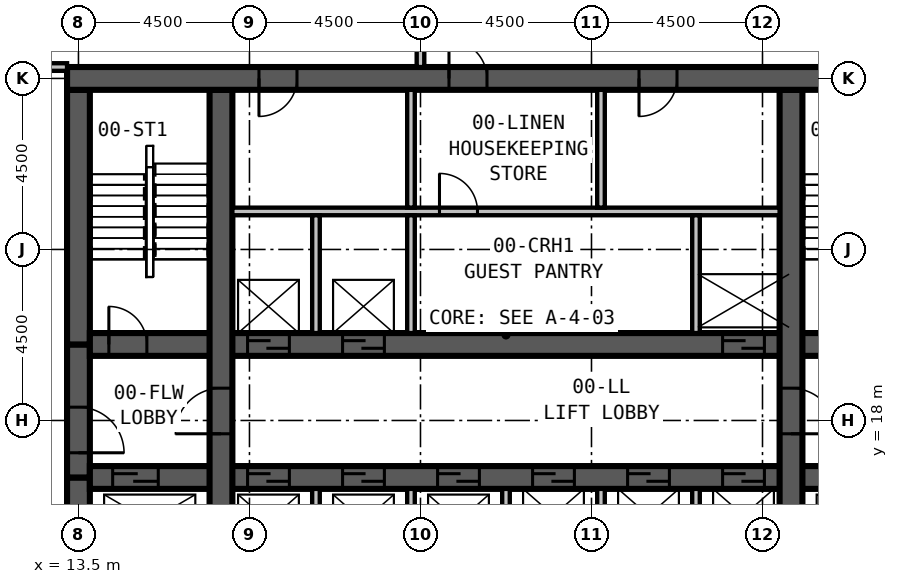
"""IFC4 building model, lengths in metres.
Left out: names, types, materials, properties, quantities, classifications, styles, units other than length and angle.
Written with IfcOpenShell. Run it as: python <this file> out.ifc"""

import sys

from ifc_helpers import new_model, si_unit, direction, frame, frame_2d, origin, place, context, subcontext, project, spatial, rectangle, extrude, element, fill, save


model = new_model("IFC4")
c1 = context("Model", 3, precision=1e-05, world=origin(), true_north=direction((0.0, 1.0)))
c2 = subcontext(c1, "Body", "Model", "MODEL_VIEW")
j1 = project(units=[si_unit("LENGTHUNIT", "METRE"), si_unit("PLANEANGLEUNIT", "RADIAN")], contexts=[c1])
p1 = place(None, origin())
s1 = spatial("IfcSite", under=j1, at=p1, CompositionType="ELEMENT")
p2 = place(p1, origin())
s2 = spatial("IfcBuilding", under=s1, at=p2, CompositionType="ELEMENT")
p3 = place(p2, origin())
s3 = spatial("IfcBuildingStorey", under=s2, at=p3, CompositionType="ELEMENT", Elevation=0.0)
p4 = place(p3, frame((36.3, 27.0, 0.0), z_axis=(0.0, 0.0, 1.0), x_axis=(-1.0, 0.0, 0.0)))
e1 = element("IfcWall", 1, at=p4, inside=s3, PredefinedType="SHEAR", context=c2, shape_type="SweptSolid", body=[
    extrude(rectangle(XDim=23.1, YDim=0.6, at=frame_2d((11.55, 0.0))), origin(), (0.0, 0.0, 1.0), 6.0),
])
p5 = place(p4, frame((17.05, 0.0, 0.0)))
e2 = element("IfcOpeningElement", 2, at=p5, cuts=e1, PredefinedType="OPENING", context=c2, shape_type="SweptSolid", body=[
    extrude(rectangle(XDim=1.0, YDim=2.1, at=frame_2d((0.5, 1.05))), frame((0.0, 0.31, 0.0), z_axis=(0.0, -1.0, 0.0), x_axis=(1.0, 0.0, 0.0)), (0.0, 0.0, 1.0), 0.62),
])
p6 = place(p4, frame((13.05, 0.0, 0.0), z_axis=(0.0, 0.0, 1.0), x_axis=(-1.0, 0.0, 0.0)))
e3 = element("IfcOpeningElement", 3, at=p6, cuts=e1, PredefinedType="OPENING", context=c2, shape_type="SweptSolid", body=[
    extrude(rectangle(XDim=1.0, YDim=2.1, at=frame_2d((0.5, 1.05))), frame((0.0, 0.31, 0.0), z_axis=(0.0, -1.0, 0.0), x_axis=(1.0, 0.0, 0.0)), (0.0, 0.0, 1.0), 0.62),
])
p7 = place(p4, frame((7.05, 0.0, 0.0)))
e4 = element("IfcOpeningElement", 4, at=p7, cuts=e1, PredefinedType="OPENING", context=c2, shape_type="SweptSolid", body=[
    extrude(rectangle(XDim=1.0, YDim=2.1, at=frame_2d((0.5, 1.05))), frame((0.0, 0.31, 0.0), z_axis=(0.0, -1.0, 0.0), x_axis=(1.0, 0.0, 0.0)), (0.0, 0.0, 1.0), 0.62),
])
p8 = place(p3, frame((17.25, 13.8, 0.0), z_axis=(0.0, 0.0, 1.0), x_axis=(0.0, 1.0, 0.0)))
e5 = element("IfcWall", 5, at=p8, inside=s3, PredefinedType="SHEAR", context=c2, shape_type="SweptSolid", body=[
    extrude(rectangle(XDim=12.9, YDim=0.6, at=frame_2d((6.45, 0.0))), origin(), (0.0, 0.0, 1.0), 6.0),
])
p9 = place(p8, frame((3.85, 0.0, 0.0)))
e6 = element("IfcOpeningElement", 6, at=p9, cuts=e5, PredefinedType="OPENING", context=c2, shape_type="SweptSolid", body=[
    extrude(rectangle(XDim=1.2, YDim=2.1, at=frame_2d((0.6, 1.05))), frame((0.0, 0.31, 0.0), z_axis=(0.0, -1.0, 0.0), x_axis=(1.0, 0.0, 0.0)), (0.0, 0.0, 1.0), 0.62),
])
p10 = place(p3, frame((32.25, 13.8, 0.0), z_axis=(0.0, 0.0, 1.0), x_axis=(0.0, 1.0, 0.0)))
e7 = element("IfcWall", 7, at=p10, inside=s3, PredefinedType="SHEAR", context=c2, shape_type="SweptSolid", body=[
    extrude(rectangle(XDim=12.9, YDim=0.6, at=frame_2d((6.45, 0.0))), origin(), (0.0, 0.0, 1.0), 6.0),
])
p11 = place(p10, frame((5.05, 0.0, 0.0), z_axis=(0.0, 0.0, 1.0), x_axis=(-1.0, 0.0, 0.0)))
e8 = element("IfcOpeningElement", 8, at=p11, cuts=e7, PredefinedType="OPENING", context=c2, shape_type="SweptSolid", body=[
    extrude(rectangle(XDim=1.2, YDim=2.1, at=frame_2d((0.6, 1.05))), frame((0.0, 0.31, 0.0), z_axis=(0.0, -1.0, 0.0), x_axis=(1.0, 0.0, 0.0)), (0.0, 0.0, 1.0), 0.62),
])
p12 = place(p3, frame((13.8, 16.5, 0.0), z_axis=(0.0, 0.0, 1.0), x_axis=(1.0, 0.0, 0.0)))
e9 = element("IfcWall", 9, at=p12, inside=s3, PredefinedType="SHEAR", context=c2, shape_type="SweptSolid", body=[
    extrude(rectangle(XDim=21.9, YDim=0.6, at=frame_2d((10.95, 0.0))), origin(), (0.0, 0.0, 1.0), 6.0),
])
p13 = place(p12, frame((4.15, 0.0, 0.0)))
e10 = element("IfcOpeningElement", 10, at=p13, cuts=e9, PredefinedType="OPENING", context=c2, shape_type="SweptSolid", body=[
    extrude(rectangle(XDim=1.1, YDim=2.1, at=frame_2d((0.55, 1.05))), frame((0.0, 0.31, 0.0), z_axis=(0.0, -1.0, 0.0), x_axis=(1.0, 0.0, 0.0)), (0.0, 0.0, 1.0), 0.62),
])
p14 = place(p12, frame((6.65, 0.0, 0.0)))
e11 = element("IfcOpeningElement", 11, at=p14, cuts=e9, PredefinedType="OPENING", context=c2, shape_type="SweptSolid", body=[
    extrude(rectangle(XDim=1.1, YDim=2.1, at=frame_2d((0.55, 1.05))), frame((0.0, 0.31, 0.0), z_axis=(0.0, -1.0, 0.0), x_axis=(1.0, 0.0, 0.0)), (0.0, 0.0, 1.0), 0.62),
])
p15 = place(p12, frame((9.15, 0.0, 0.0)))
e12 = element("IfcOpeningElement", 12, at=p15, cuts=e9, PredefinedType="OPENING", context=c2, shape_type="SweptSolid", body=[
    extrude(rectangle(XDim=1.1, YDim=2.1, at=frame_2d((0.55, 1.05))), frame((0.0, 0.31, 0.0), z_axis=(0.0, -1.0, 0.0), x_axis=(1.0, 0.0, 0.0)), (0.0, 0.0, 1.0), 0.62),
])
p16 = place(p12, frame((11.65, 0.0, 0.0)))
e13 = element("IfcOpeningElement", 13, at=p16, cuts=e9, PredefinedType="OPENING", context=c2, shape_type="SweptSolid", body=[
    extrude(rectangle(XDim=1.1, YDim=2.1, at=frame_2d((0.55, 1.05))), frame((0.0, 0.31, 0.0), z_axis=(0.0, -1.0, 0.0), x_axis=(1.0, 0.0, 0.0)), (0.0, 0.0, 1.0), 0.62),
])
p17 = place(p12, frame((14.15, 0.0, 0.0)))
e14 = element("IfcOpeningElement", 14, at=p17, cuts=e9, PredefinedType="OPENING", context=c2, shape_type="SweptSolid", body=[
    extrude(rectangle(XDim=1.1, YDim=2.1, at=frame_2d((0.55, 1.05))), frame((0.0, 0.31, 0.0), z_axis=(0.0, -1.0, 0.0), x_axis=(1.0, 0.0, 0.0)), (0.0, 0.0, 1.0), 0.62),
])
p18 = place(p12, frame((16.65, 0.0, 0.0)))
e15 = element("IfcOpeningElement", 15, at=p18, cuts=e9, PredefinedType="OPENING", context=c2, shape_type="SweptSolid", body=[
    extrude(rectangle(XDim=1.1, YDim=2.1, at=frame_2d((0.55, 1.05))), frame((0.0, 0.31, 0.0), z_axis=(0.0, -1.0, 0.0), x_axis=(1.0, 0.0, 0.0)), (0.0, 0.0, 1.0), 0.62),
])
p19 = place(p12, frame((0.6, 0.0, 0.0)))
e16 = element("IfcOpeningElement", 16, at=p19, cuts=e9, PredefinedType="OPENING", context=c2, shape_type="SweptSolid", body=[
    extrude(rectangle(XDim=1.2, YDim=2.1, at=frame_2d((0.6, 1.05))), frame((0.0, 0.31, 0.0), z_axis=(0.0, -1.0, 0.0), x_axis=(1.0, 0.0, 0.0)), (0.0, 0.0, 1.0), 0.62),
])
p20 = place(p12, frame((19.6, 0.0, 0.0)))
e17 = element("IfcOpeningElement", 17, at=p20, cuts=e9, PredefinedType="OPENING", context=c2, shape_type="SweptSolid", body=[
    extrude(rectangle(XDim=1.2, YDim=2.1, at=frame_2d((0.6, 1.05))), frame((0.0, 0.31, 0.0), z_axis=(0.0, -1.0, 0.0), x_axis=(1.0, 0.0, 0.0)), (0.0, 0.0, 1.0), 0.62),
])
p21 = place(p3, frame((13.8, 20.0, 0.0), z_axis=(0.0, 0.0, 1.0), x_axis=(1.0, 0.0, 0.0)))
e18 = element("IfcWall", 18, at=p21, inside=s3, PredefinedType="SHEAR", context=c2, shape_type="SweptSolid", body=[
    extrude(rectangle(XDim=21.9, YDim=0.6, at=frame_2d((10.95, 0.0))), origin(), (0.0, 0.0, 1.0), 6.0),
])
p22 = place(p21, frame((0.5, 0.0, 0.0)))
e19 = element("IfcOpeningElement", 19, at=p22, cuts=e18, PredefinedType="OPENING", context=c2, shape_type="SweptSolid", body=[
    extrude(rectangle(XDim=1.0, YDim=2.1, at=frame_2d((0.5, 1.05))), frame((0.0, 0.31, 0.0), z_axis=(0.0, -1.0, 0.0), x_axis=(1.0, 0.0, 0.0)), (0.0, 0.0, 1.0), 0.62),
])
p23 = place(p21, frame((20.5, 0.0, 0.0)))
e20 = element("IfcOpeningElement", 20, at=p23, cuts=e18, PredefinedType="OPENING", context=c2, shape_type="SweptSolid", body=[
    extrude(rectangle(XDim=1.0, YDim=2.1, at=frame_2d((0.5, 1.05))), frame((0.0, 0.31, 0.0), z_axis=(0.0, -1.0, 0.0), x_axis=(1.0, 0.0, 0.0)), (0.0, 0.0, 1.0), 0.62),
])
p24 = place(p21, frame((4.15, 0.0, 0.0)))
e21 = element("IfcOpeningElement", 21, at=p24, cuts=e18, PredefinedType="OPENING", context=c2, shape_type="SweptSolid", body=[
    extrude(rectangle(XDim=1.1, YDim=2.1, at=frame_2d((0.55, 1.05))), frame((0.0, 0.31, 0.0), z_axis=(0.0, -1.0, 0.0), x_axis=(1.0, 0.0, 0.0)), (0.0, 0.0, 1.0), 0.62),
])
p25 = place(p21, frame((6.65, 0.0, 0.0)))
e22 = element("IfcOpeningElement", 22, at=p25, cuts=e18, PredefinedType="OPENING", context=c2, shape_type="SweptSolid", body=[
    extrude(rectangle(XDim=1.1, YDim=2.1, at=frame_2d((0.55, 1.05))), frame((0.0, 0.31, 0.0), z_axis=(0.0, -1.0, 0.0), x_axis=(1.0, 0.0, 0.0)), (0.0, 0.0, 1.0), 0.62),
])
p26 = place(p21, frame((16.65, 0.0, 0.0)))
e23 = element("IfcOpeningElement", 23, at=p26, cuts=e18, PredefinedType="OPENING", context=c2, shape_type="SweptSolid", body=[
    extrude(rectangle(XDim=1.1, YDim=2.1, at=frame_2d((0.55, 1.05))), frame((0.0, 0.31, 0.0), z_axis=(0.0, -1.0, 0.0), x_axis=(1.0, 0.0, 0.0)), (0.0, 0.0, 1.0), 0.62),
])
p27 = place(p3, frame((13.5, 26.7, 0.0), z_axis=(0.0, 0.0, 1.0), x_axis=(0.0, -1.0, 0.0)))
e24 = element("IfcWall", 24, at=p27, inside=s3, PredefinedType="SHEAR", context=c2, shape_type="SweptSolid", body=[
    extrude(rectangle(XDim=6.7, YDim=0.6, at=frame_2d((3.35, 0.0))), origin(), (0.0, 0.0, 1.0), 6.0),
])
p28 = place(p3, frame((13.5, 20.0, 0.0), z_axis=(0.0, 0.0, 1.0), x_axis=(0.0, -1.0, 0.0)))
e25 = element("IfcWall", 25, at=p28, inside=s3, PredefinedType="SHEAR", context=c2, shape_type="SweptSolid", body=[
    extrude(rectangle(XDim=3.5, YDim=0.6, at=frame_2d((1.75, 0.0))), origin(), (0.0, 0.0, 1.0), 6.0),
])
p29 = place(p28, frame((1.65, 0.0, 0.0)))
e26 = element("IfcOpeningElement", 26, at=p29, cuts=e25, PredefinedType="OPENING", context=c2, shape_type="SweptSolid", body=[
    extrude(rectangle(XDim=1.2, YDim=2.1, at=frame_2d((0.6, 1.05))), frame((0.0, 0.31, 0.0), z_axis=(0.0, -1.0, 0.0), x_axis=(1.0, 0.0, 0.0)), (0.0, 0.0, 1.0), 0.62),
])
p30 = place(p3, frame((13.5, 16.5, 0.0), z_axis=(0.0, 0.0, 1.0), x_axis=(0.0, -1.0, 0.0)))
e27 = element("IfcWall", 27, at=p30, inside=s3, PredefinedType="SHEAR", context=c2, shape_type="SweptSolid", body=[
    extrude(rectangle(XDim=2.7, YDim=0.6, at=frame_2d((1.35, 0.0))), origin(), (0.0, 0.0, 1.0), 6.0),
])
p31 = place(p3, frame((4.3, 27.3, 0.0), z_axis=(0.0, 0.0, 1.0), x_axis=(1.0, 0.0, 0.0)))
e28 = element("IfcWall", 28, at=p31, inside=s3, PredefinedType="PARTITIONING", context=c2, shape_type="SweptSolid", body=[
    extrude(rectangle(XDim=8.9, YDim=0.2, at=frame_2d((4.45, 0.0))), origin(), (0.0, 0.0, 1.0), 4.4),
])
p32 = place(p31, frame((7.5, 0.0, 0.0), z_axis=(0.0, 0.0, 1.0), x_axis=(-1.0, 0.0, 0.0)))
e29 = element("IfcOpeningElement", 29, at=p32, cuts=e28, PredefinedType="OPENING", context=c2, shape_type="SweptSolid", body=[
    extrude(rectangle(XDim=1.8, YDim=2.4, at=frame_2d((0.9, 1.2))), frame((0.0, 0.11, 0.0), z_axis=(0.0, -1.0, 0.0), x_axis=(1.0, 0.0, 0.0)), (0.0, 0.0, 1.0), 0.22),
])
p33 = place(p3, frame((22.5, 27.3, 0.0), z_axis=(0.0, 0.0, 1.0), x_axis=(0.0, 1.0, 0.0)))
e30 = element("IfcWall", 30, at=p33, inside=s3, PredefinedType="PARTITIONING", context=c2, shape_type="SweptSolid", body=[
    extrude(rectangle(XDim=11.9, YDim=0.2, at=frame_2d((5.95, 0.0))), origin(), (0.0, 0.0, 1.0), 4.7),
])
p34 = place(p3, frame((19.75, 13.8, 0.0), z_axis=(0.0, 0.0, 1.0), x_axis=(0.0, 1.0, 0.0)))
e31 = element("IfcWall", 31, at=p34, inside=s3, PredefinedType="PARTITIONING", context=c2, shape_type="SweptSolid", body=[
    extrude(rectangle(XDim=2.4, YDim=0.2, at=frame_2d((1.2, 0.0))), origin(), (0.0, 0.0, 1.0), 5.7),
])
p35 = place(p3, frame((19.75, 20.3, 0.0), z_axis=(0.0, 0.0, 1.0), x_axis=(0.0, 1.0, 0.0)))
e32 = element("IfcWall", 32, at=p35, inside=s3, PredefinedType="PARTITIONING", context=c2, shape_type="SweptSolid", body=[
    extrude(rectangle(XDim=3.1, YDim=0.2, at=frame_2d((1.55, 0.0))), origin(), (0.0, 0.0, 1.0), 5.7),
])
p36 = place(p3, frame((22.25, 13.8, 0.0), z_axis=(0.0, 0.0, 1.0), x_axis=(0.0, 1.0, 0.0)))
e33 = element("IfcWall", 33, at=p36, inside=s3, PredefinedType="PARTITIONING", context=c2, shape_type="SweptSolid", body=[
    extrude(rectangle(XDim=2.4, YDim=0.2, at=frame_2d((1.2, 0.0))), origin(), (0.0, 0.0, 1.0), 5.7),
])
p37 = place(p3, frame((22.25, 20.3, 0.0), z_axis=(0.0, 0.0, 1.0), x_axis=(0.0, 1.0, 0.0)))
e34 = element("IfcWall", 34, at=p37, inside=s3, PredefinedType="PARTITIONING", context=c2, shape_type="SweptSolid", body=[
    extrude(rectangle(XDim=3.1, YDim=0.2, at=frame_2d((1.55, 0.0))), origin(), (0.0, 0.0, 1.0), 5.7),
])
for number, where, z_axis, x_axis in (
    (35, (24.75, 13.8, 0.0), (0.0, 0.0, 1.0), (0.0, 1.0, 0.0)),
    (36, (27.25, 13.8, 0.0), (0.0, 0.0, 1.0), (0.0, 1.0, 0.0)),
    (37, (29.75, 13.8, 0.0), (0.0, 0.0, 1.0), (0.0, 1.0, 0.0)),
):
    element("IfcWall", number, at=place(p3, frame(where, z_axis=z_axis, x_axis=x_axis)), inside=s3, PredefinedType="PARTITIONING", context=c2, shape_type="SweptSolid", body=[
        extrude(rectangle(XDim=2.4, YDim=0.2, at=frame_2d((1.2, 0.0))), origin(), (0.0, 0.0, 1.0), 5.7),
    ])
p38 = place(p3, frame((29.75, 20.3, 0.0), z_axis=(0.0, 0.0, 1.0), x_axis=(0.0, 1.0, 0.0)))
e38 = element("IfcWall", 38, at=p38, inside=s3, PredefinedType="PARTITIONING", context=c2, shape_type="SweptSolid", body=[
    extrude(rectangle(XDim=3.1, YDim=0.2, at=frame_2d((1.55, 0.0))), origin(), (0.0, 0.0, 1.0), 5.7),
])
p39 = place(p3, frame((17.55, 23.5, 0.0), z_axis=(0.0, 0.0, 1.0), x_axis=(1.0, 0.0, 0.0)))
e39 = element("IfcWall", 39, at=p39, inside=s3, PredefinedType="PARTITIONING", context=c2, shape_type="SweptSolid", body=[
    extrude(rectangle(XDim=14.4, YDim=0.2, at=frame_2d((7.2, 0.0))), origin(), (0.0, 0.0, 1.0), 5.7),
])
p40 = place(p39, frame((5.45, 0.0, 0.0)))
e40 = element("IfcOpeningElement", 40, at=p40, cuts=e39, PredefinedType="OPENING", context=c2, shape_type="SweptSolid", body=[
    extrude(rectangle(XDim=1.0, YDim=2.1, at=frame_2d((0.5, 1.05))), frame((0.0, 0.11, 0.0), z_axis=(0.0, -1.0, 0.0), x_axis=(1.0, 0.0, 0.0)), (0.0, 0.0, 1.0), 0.22),
])
for number, where, z_axis, x_axis in (
    (41, (22.25, 23.6, 0.0), (0.0, 0.0, 1.0), (0.0, 1.0, 0.0)),
    (42, (27.25, 23.6, 0.0), (0.0, 0.0, 1.0), (0.0, 1.0, 0.0)),
):
    element("IfcWall", number, at=place(p3, frame(where, z_axis=z_axis, x_axis=x_axis)), inside=s3, PredefinedType="PARTITIONING", context=c2, shape_type="SweptSolid", body=[
        extrude(rectangle(XDim=3.1, YDim=0.2, at=frame_2d((1.55, 0.0))), origin(), (0.0, 0.0, 1.0), 5.7),
    ])
p41 = place(p40, origin())
e43 = element("IfcDoor", 43, at=p41, inside=s3, OperationType="SINGLE_SWING_LEFT", PredefinedType="DOOR", context=c2, shape_type="SweptSolid", body=[
    extrude(rectangle(XDim=1.0, YDim=2.1, at=frame_2d((0.5, 1.05))), frame((0.0, 0.025, 0.0), z_axis=(0.0, -1.0, 0.0), x_axis=(1.0, 0.0, 0.0)), (0.0, 0.0, 1.0), 0.05),
])
fill(e40, e43)
p42 = place(p29, origin())
e44 = element("IfcDoor", 44, at=p42, inside=s3, OperationType="SINGLE_SWING_RIGHT", PredefinedType="DOOR", context=c2, shape_type="SweptSolid", body=[
    extrude(rectangle(XDim=1.2, YDim=2.1, at=frame_2d((0.6, 1.05))), frame((0.0, 0.3, 0.0), z_axis=(0.0, -1.0, 0.0), x_axis=(1.0, 0.0, 0.0)), (0.0, 0.0, 1.0), 0.6),
])
fill(e26, e44)
p43 = place(p9, origin())
e45 = element("IfcDoor", 45, at=p43, inside=s3, OperationType="SINGLE_SWING_LEFT", PredefinedType="DOOR", context=c2, shape_type="SweptSolid", body=[
    extrude(rectangle(XDim=1.2, YDim=2.1, at=frame_2d((0.6, 1.05))), frame((0.0, 0.3, 0.0), z_axis=(0.0, -1.0, 0.0), x_axis=(1.0, 0.0, 0.0)), (0.0, 0.0, 1.0), 0.6),
])
fill(e6, e45)
p44 = place(p11, origin())
e46 = element("IfcDoor", 46, at=p44, inside=s3, OperationType="SINGLE_SWING_RIGHT", PredefinedType="DOOR", context=c2, shape_type="SweptSolid", body=[
    extrude(rectangle(XDim=1.2, YDim=2.1, at=frame_2d((0.6, 1.05))), frame((0.0, 0.3, 0.0), z_axis=(0.0, -1.0, 0.0), x_axis=(1.0, 0.0, 0.0)), (0.0, 0.0, 1.0), 0.6),
])
fill(e8, e46)
p45 = place(p22, origin())
e47 = element("IfcDoor", 47, at=p45, inside=s3, OperationType="SINGLE_SWING_LEFT", PredefinedType="DOOR", context=c2, shape_type="SweptSolid", body=[
    extrude(rectangle(XDim=1.0, YDim=2.1, at=frame_2d((0.5, 1.05))), frame((0.0, 0.3, 0.0), z_axis=(0.0, -1.0, 0.0), x_axis=(1.0, 0.0, 0.0)), (0.0, 0.0, 1.0), 0.6),
])
fill(e19, e47)
p46 = place(p13, origin())
e48 = element("IfcDoor", 48, at=p46, inside=s3, OperationType="SLIDING_TO_LEFT", PredefinedType="DOOR", context=c2, shape_type="SweptSolid", body=[
    extrude(rectangle(XDim=1.1, YDim=2.1, at=frame_2d((0.55, 1.05))), frame((0.0, 0.3, 0.0), z_axis=(0.0, -1.0, 0.0), x_axis=(1.0, 0.0, 0.0)), (0.0, 0.0, 1.0), 0.6),
])
fill(e10, e48)
p47 = place(p14, origin())
e49 = element("IfcDoor", 49, at=p47, inside=s3, OperationType="SLIDING_TO_LEFT", PredefinedType="DOOR", context=c2, shape_type="SweptSolid", body=[
    extrude(rectangle(XDim=1.1, YDim=2.1, at=frame_2d((0.55, 1.05))), frame((0.0, 0.3, 0.0), z_axis=(0.0, -1.0, 0.0), x_axis=(1.0, 0.0, 0.0)), (0.0, 0.0, 1.0), 0.6),
])
fill(e11, e49)
p48 = place(p15, origin())
e50 = element("IfcDoor", 50, at=p48, inside=s3, OperationType="SLIDING_TO_LEFT", PredefinedType="DOOR", context=c2, shape_type="SweptSolid", body=[
    extrude(rectangle(XDim=1.1, YDim=2.1, at=frame_2d((0.55, 1.05))), frame((0.0, 0.3, 0.0), z_axis=(0.0, -1.0, 0.0), x_axis=(1.0, 0.0, 0.0)), (0.0, 0.0, 1.0), 0.6),
])
fill(e12, e50)
p49 = place(p16, origin())
e51 = element("IfcDoor", 51, at=p49, inside=s3, OperationType="SLIDING_TO_LEFT", PredefinedType="DOOR", context=c2, shape_type="SweptSolid", body=[
    extrude(rectangle(XDim=1.1, YDim=2.1, at=frame_2d((0.55, 1.05))), frame((0.0, 0.3, 0.0), z_axis=(0.0, -1.0, 0.0), x_axis=(1.0, 0.0, 0.0)), (0.0, 0.0, 1.0), 0.6),
])
fill(e13, e51)
p50 = place(p17, origin())
e52 = element("IfcDoor", 52, at=p50, inside=s3, OperationType="SLIDING_TO_LEFT", PredefinedType="DOOR", context=c2, shape_type="SweptSolid", body=[
    extrude(rectangle(XDim=1.1, YDim=2.1, at=frame_2d((0.55, 1.05))), frame((0.0, 0.3, 0.0), z_axis=(0.0, -1.0, 0.0), x_axis=(1.0, 0.0, 0.0)), (0.0, 0.0, 1.0), 0.6),
])
fill(e14, e52)
p51 = place(p18, origin())
e53 = element("IfcDoor", 53, at=p51, inside=s3, OperationType="SLIDING_TO_LEFT", PredefinedType="DOOR", context=c2, shape_type="SweptSolid", body=[
    extrude(rectangle(XDim=1.1, YDim=2.1, at=frame_2d((0.55, 1.05))), frame((0.0, 0.3, 0.0), z_axis=(0.0, -1.0, 0.0), x_axis=(1.0, 0.0, 0.0)), (0.0, 0.0, 1.0), 0.6),
])
fill(e15, e53)
p52 = place(p24, origin())
e54 = element("IfcDoor", 54, at=p52, inside=s3, OperationType="SLIDING_TO_LEFT", PredefinedType="DOOR", context=c2, shape_type="SweptSolid", body=[
    extrude(rectangle(XDim=1.1, YDim=2.1, at=frame_2d((0.55, 1.05))), frame((0.0, 0.3, 0.0), z_axis=(0.0, -1.0, 0.0), x_axis=(1.0, 0.0, 0.0)), (0.0, 0.0, 1.0), 0.6),
])
fill(e21, e54)
p53 = place(p25, origin())
e55 = element("IfcDoor", 55, at=p53, inside=s3, OperationType="SLIDING_TO_LEFT", PredefinedType="DOOR", context=c2, shape_type="SweptSolid", body=[
    extrude(rectangle(XDim=1.1, YDim=2.1, at=frame_2d((0.55, 1.05))), frame((0.0, 0.3, 0.0), z_axis=(0.0, -1.0, 0.0), x_axis=(1.0, 0.0, 0.0)), (0.0, 0.0, 1.0), 0.6),
])
fill(e22, e55)
p54 = place(p26, origin())
e56 = element("IfcDoor", 56, at=p54, inside=s3, OperationType="SLIDING_TO_LEFT", PredefinedType="DOOR", context=c2, shape_type="SweptSolid", body=[
    extrude(rectangle(XDim=1.1, YDim=2.1, at=frame_2d((0.55, 1.05))), frame((0.0, 0.3, 0.0), z_axis=(0.0, -1.0, 0.0), x_axis=(1.0, 0.0, 0.0)), (0.0, 0.0, 1.0), 0.6),
])
fill(e23, e56)
p55 = place(p19, origin())
e57 = element("IfcDoor", 57, at=p55, inside=s3, OperationType="SLIDING_TO_LEFT", PredefinedType="DOOR", context=c2, shape_type="SweptSolid", body=[
    extrude(rectangle(XDim=1.2, YDim=2.1, at=frame_2d((0.6, 1.05))), frame((0.0, 0.3, 0.0), z_axis=(0.0, -1.0, 0.0), x_axis=(1.0, 0.0, 0.0)), (0.0, 0.0, 1.0), 0.6),
])
fill(e16, e57)
p56 = place(p5, origin())
e58 = element("IfcDoor", 58, at=p56, inside=s3, OperationType="SINGLE_SWING_RIGHT", PredefinedType="DOOR", context=c2, shape_type="SweptSolid", body=[
    extrude(rectangle(XDim=1.0, YDim=2.1, at=frame_2d((0.5, 1.05))), frame((0.0, 0.3, 0.0), z_axis=(0.0, -1.0, 0.0), x_axis=(1.0, 0.0, 0.0)), (0.0, 0.0, 1.0), 0.6),
])
fill(e2, e58)
p57 = place(p6, origin())
e59 = element("IfcDoor", 59, at=p57, inside=s3, OperationType="SINGLE_SWING_LEFT", PredefinedType="DOOR", context=c2, shape_type="SweptSolid", body=[
    extrude(rectangle(XDim=1.0, YDim=2.1, at=frame_2d((0.5, 1.05))), frame((0.0, 0.3, 0.0), z_axis=(0.0, -1.0, 0.0), x_axis=(1.0, 0.0, 0.0)), (0.0, 0.0, 1.0), 0.6),
])
fill(e3, e59)
p58 = place(p7, origin())
e60 = element("IfcDoor", 60, at=p58, inside=s3, OperationType="SINGLE_SWING_RIGHT", PredefinedType="DOOR", context=c2, shape_type="SweptSolid", body=[
    extrude(rectangle(XDim=1.0, YDim=2.1, at=frame_2d((0.5, 1.05))), frame((0.0, 0.3, 0.0), z_axis=(0.0, -1.0, 0.0), x_axis=(1.0, 0.0, 0.0)), (0.0, 0.0, 1.0), 0.6),
])
fill(e4, e60)
save(model, sys.argv[1])
